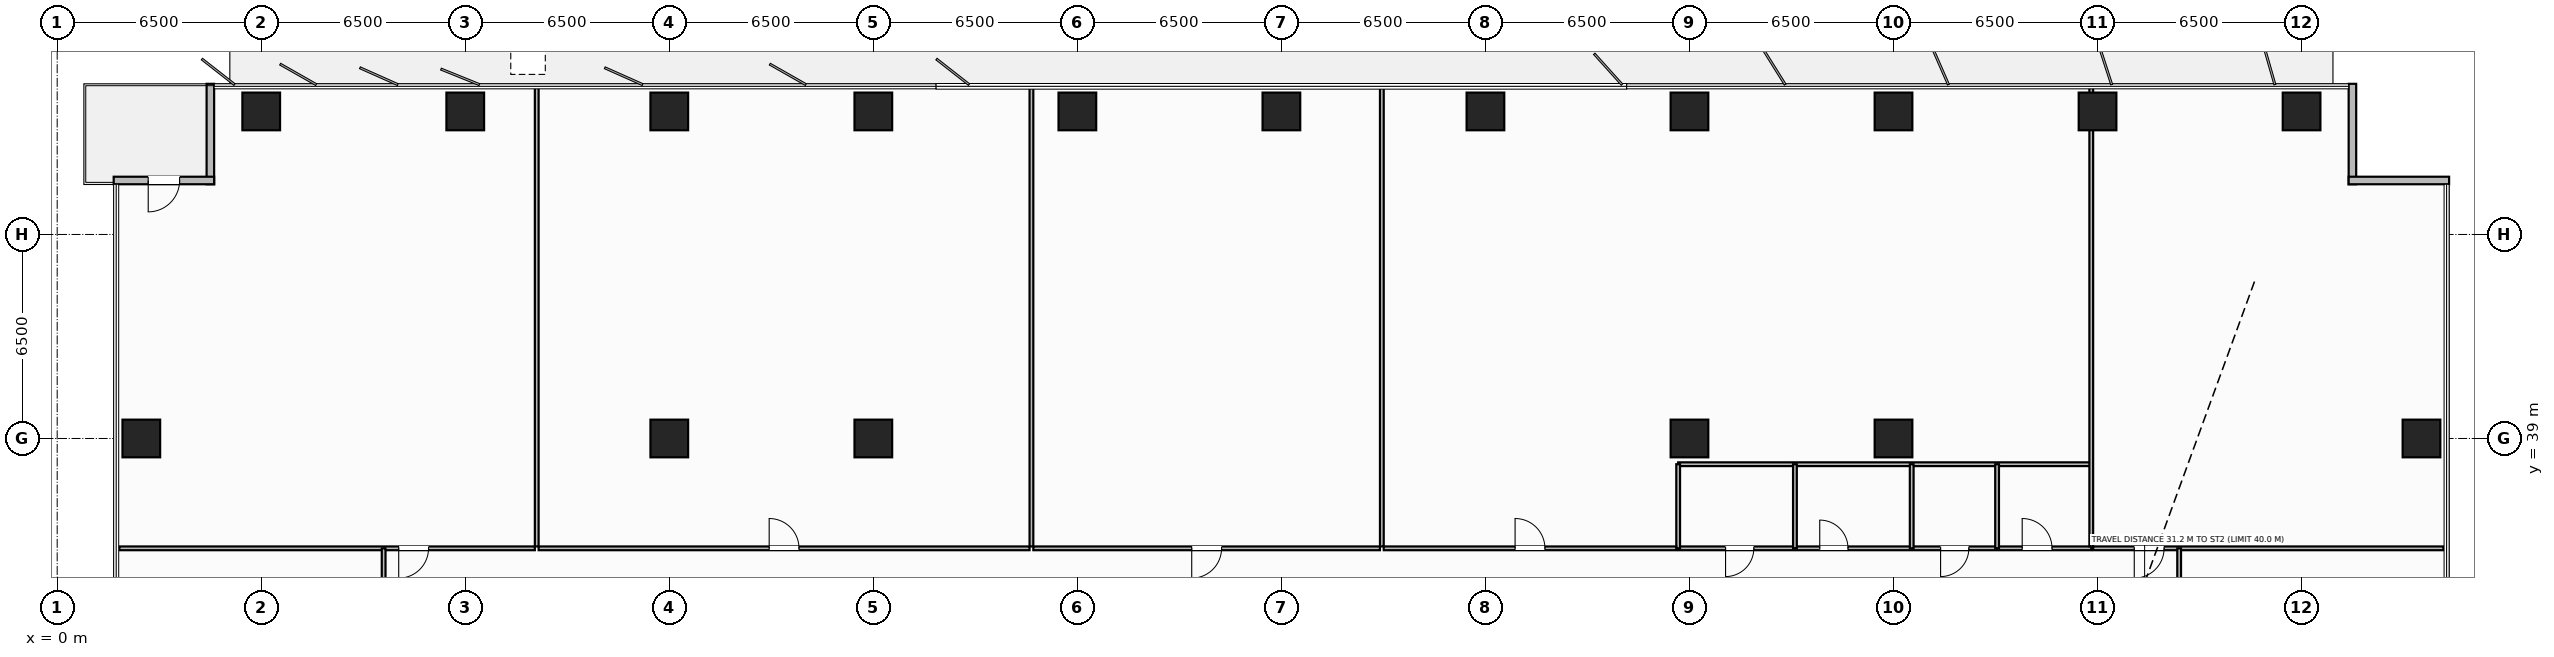
"""IFC4 building model, lengths in metres.
Left out: names, types, materials, properties, quantities, classifications, styles, units other than length and angle.
Written with IfcOpenShell. Run it as: python <this file> out.ifc"""

import sys

from ifc_helpers import new_model, si_unit, direction, frame, frame_2d, origin, origin_2d, place, context, subcontext, project, spatial, rectangle, extrude, element, fill, save


model = new_model("IFC4")
c1 = context("Model", 3, precision=1e-05, world=origin(), true_north=direction((0.0, 1.0)))
c2 = subcontext(c1, "Body", "Model", "MODEL_VIEW")
j1 = project(units=[si_unit("LENGTHUNIT", "METRE"), si_unit("PLANEANGLEUNIT", "RADIAN")], contexts=[c1])
p1 = place(None, origin())
s1 = spatial("IfcSite", under=j1, at=p1, CompositionType="ELEMENT")
p2 = place(p1, origin())
s2 = spatial("IfcBuilding", under=s1, at=p2, CompositionType="ELEMENT")
p3 = place(p2, frame((0.0, 0.0, 86.0)))
s3 = spatial("IfcBuildingStorey", under=s2, at=p3, CompositionType="ELEMENT", Elevation=86.0)
for number, where, z_axis, x_axis in (
    (1, (19.5, 39.0, 0.0), (0.0, 0.0, 1.0), (1.0, 0.0, 0.0)),
    (2, (58.5, 39.0, 0.0), (0.0, 0.0, 1.0), (1.0, 0.0, 0.0)),
    (3, (26.0, 39.0, 0.0), (0.0, 0.0, 1.0), (1.0, 0.0, 0.0)),
    (4, (52.0, 39.0, 0.0), (0.0, 0.0, 1.0), (1.0, 0.0, 0.0)),
    (5, (6.5, 49.42, 0.0), (0.0, 0.0, 1.0), (1.0, 0.0, 0.0)),
    (6, (13.0, 49.42, 0.0), (0.0, 0.0, 1.0), (1.0, 0.0, 0.0)),
    (7, (19.5, 49.42, 0.0), (0.0, 0.0, 1.0), (1.0, 0.0, 0.0)),
    (8, (26.0, 49.42, 0.0), (0.0, 0.0, 1.0), (1.0, 0.0, 0.0)),
    (9, (32.5, 49.42, 0.0), (0.0, 0.0, 1.0), (1.0, 0.0, 0.0)),
    (10, (39.0, 49.42, 0.0), (0.0, 0.0, 1.0), (1.0, 0.0, 0.0)),
    (11, (45.5, 49.42, 0.0), (0.0, 0.0, 1.0), (1.0, 0.0, 0.0)),
    (12, (52.0, 49.42, 0.0), (0.0, 0.0, 1.0), (1.0, 0.0, 0.0)),
    (13, (58.5, 49.42, 0.0), (0.0, 0.0, 1.0), (1.0, 0.0, 0.0)),
    (14, (65.0, 49.42, 0.0), (0.0, 0.0, 1.0), (1.0, 0.0, 0.0)),
    (15, (71.5, 49.42, 0.0), (0.0, 0.0, 1.0), (1.0, 0.0, 0.0)),
    (16, (2.68, 39.0, 0.0), (0.0, 0.0, 1.0), (1.0, 0.0, 0.0)),
    (17, (75.32, 39.0, 0.0), (0.0, 0.0, 1.0), (1.0, 0.0, 0.0)),
):
    element("IfcColumn", number, at=place(p3, frame(where, z_axis=z_axis, x_axis=x_axis)), inside=s3, PredefinedType="COLUMN", context=c2, shape_type="SweptSolid", body=[
        extrude(rectangle(XDim=1.2, YDim=1.2, at=origin_2d()), origin(), (0.0, 0.0, 1.0), 3.8),
    ])
p4 = place(p3, frame((4.88, 47.1, 0.0), z_axis=(0.0, 0.0, 1.0), x_axis=(0.0, 1.0, 0.0)))
e18 = element("IfcWall", 18, at=p4, inside=s3, PredefinedType="STANDARD", context=c2, shape_type="SweptSolid", body=[
    extrude(rectangle(XDim=3.2, YDim=0.24, at=frame_2d((1.6, 0.0))), origin(), (0.0, 0.0, 1.0), 3.565),
])
p5 = place(p3, frame((1.8, 47.22, 0.0), z_axis=(0.0, 0.0, 1.0), x_axis=(1.0, 0.0, 0.0)))
e19 = element("IfcWall", 19, at=p5, inside=s3, PredefinedType="STANDARD", context=c2, shape_type="SweptSolid", body=[
    extrude(rectangle(XDim=3.2, YDim=0.24, at=frame_2d((1.6, 0.0))), origin(), (0.0, 0.0, 1.0), 3.565),
])
p6 = place(p5, frame((1.1, 0.0, 0.0)))
e20 = element("IfcOpeningElement", 20, at=p6, cuts=e19, PredefinedType="OPENING", context=c2, shape_type="SweptSolid", body=[
    extrude(rectangle(XDim=1.0, YDim=2.2, at=frame_2d((0.5, 1.1))), frame((0.0, 0.13, 0.0), z_axis=(0.0, -1.0, 0.0), x_axis=(1.0, 0.0, 0.0)), (0.0, 0.0, 1.0), 0.26),
])
for number, where, z_axis, x_axis in (
    (21, (73.12, 50.3, 0.0), (0.0, 0.0, 1.0), (0.0, -1.0, 0.0)),
    (22, (73.0, 47.22, 0.0), (0.0, 0.0, 1.0), (1.0, 0.0, 0.0)),
):
    element("IfcWall", number, at=place(p3, frame(where, z_axis=z_axis, x_axis=x_axis)), inside=s3, PredefinedType="STANDARD", context=c2, shape_type="SweptSolid", body=[
        extrude(rectangle(XDim=3.2, YDim=0.24, at=frame_2d((1.6, 0.0))), origin(), (0.0, 0.0, 1.0), 3.565),
    ])
p7 = place(p3, frame((51.64, 35.5, 0.0), z_axis=(0.0, 0.0, 1.0), x_axis=(1.0, 0.0, 0.0)))
e23 = element("IfcWall", 23, at=p7, inside=s3, PredefinedType="PARTITIONING", context=c2, shape_type="SweptSolid", body=[
    extrude(rectangle(XDim=13.16, YDim=0.12, at=frame_2d((6.58, 0.0))), origin(), (0.0, 0.0, 1.0), 3.565),
])
p8 = place(p7, frame((1.51, 0.0, 0.0)))
e24 = element("IfcOpeningElement", 24, at=p8, cuts=e23, PredefinedType="OPENING", context=c2, shape_type="SweptSolid", body=[
    extrude(rectangle(XDim=0.9, YDim=2.15, at=frame_2d((0.45, 1.075))), frame((0.0, 0.07, 0.0), z_axis=(0.0, -1.0, 0.0), x_axis=(1.0, 0.0, 0.0)), (0.0, 0.0, 1.0), 0.14),
])
p9 = place(p7, frame((4.51, 0.0, 0.0)))
e25 = element("IfcOpeningElement", 25, at=p9, cuts=e23, PredefinedType="OPENING", context=c2, shape_type="SweptSolid", body=[
    extrude(rectangle(XDim=0.9, YDim=2.15, at=frame_2d((0.45, 1.075))), frame((0.0, 0.07, 0.0), z_axis=(0.0, -1.0, 0.0), x_axis=(1.0, 0.0, 0.0)), (0.0, 0.0, 1.0), 0.14),
])
p10 = place(p7, frame((8.36, 0.0, 0.0)))
e26 = element("IfcOpeningElement", 26, at=p10, cuts=e23, PredefinedType="OPENING", context=c2, shape_type="SweptSolid", body=[
    extrude(rectangle(XDim=0.9, YDim=2.15, at=frame_2d((0.45, 1.075))), frame((0.0, 0.07, 0.0), z_axis=(0.0, -1.0, 0.0), x_axis=(1.0, 0.0, 0.0)), (0.0, 0.0, 1.0), 0.14),
])
p11 = place(p7, frame((10.96, 0.0, 0.0)))
e27 = element("IfcOpeningElement", 27, at=p11, cuts=e23, PredefinedType="OPENING", context=c2, shape_type="SweptSolid", body=[
    extrude(rectangle(XDim=0.95, YDim=2.15, at=frame_2d((0.475, 1.075))), frame((0.0, 0.07, 0.0), z_axis=(0.0, -1.0, 0.0), x_axis=(1.0, 0.0, 0.0)), (0.0, 0.0, 1.0), 0.14),
])
p12 = place(p3, frame((51.64, 38.18, 0.0), z_axis=(0.0, 0.0, 1.0), x_axis=(1.0, 0.0, 0.0)))
e28 = element("IfcWall", 28, at=p12, inside=s3, PredefinedType="PARTITIONING", context=c2, shape_type="SweptSolid", body=[
    extrude(rectangle(XDim=13.16, YDim=0.12, at=frame_2d((6.58, 0.0))), origin(), (0.0, 0.0, 1.0), 3.565),
])
for number, where, z_axis, x_axis in (
    (29, (51.64, 35.5, 0.0), (0.0, 0.0, 1.0), (0.0, 1.0, 0.0)),
    (30, (55.36, 35.5, 0.0), (0.0, 0.0, 1.0), (0.0, 1.0, 0.0)),
    (31, (59.08, 35.5, 0.0), (0.0, 0.0, 1.0), (0.0, 1.0, 0.0)),
    (32, (61.8, 35.5, 0.0), (0.0, 0.0, 1.0), (0.0, 1.0, 0.0)),
):
    element("IfcWall", number, at=place(p3, frame(where, z_axis=z_axis, x_axis=x_axis)), inside=s3, PredefinedType="PARTITIONING", context=c2, shape_type="SweptSolid", body=[
        extrude(rectangle(XDim=2.68, YDim=0.12, at=frame_2d((1.34, 0.0))), origin(), (0.0, 0.0, 1.0), 3.565),
    ])
p13 = place(p3, frame((15.277, 35.56, 0.0), z_axis=(0.0, 0.0, 1.0), x_axis=(0.0, 1.0, 0.0)))
e33 = element("IfcWall", 33, at=p13, inside=s3, PredefinedType="PARTITIONING", context=c2, shape_type="SweptSolid", body=[
    extrude(rectangle(XDim=14.72, YDim=0.12, at=frame_2d((7.36, 0.0))), origin(), (0.0, 0.0, 1.0), 3.565),
])
p14 = place(p3, frame((1.98, 35.5, 0.0), z_axis=(0.0, 0.0, 1.0), x_axis=(1.0, 0.0, 0.0)))
e34 = element("IfcWall", 34, at=p14, inside=s3, PredefinedType="PARTITIONING", context=c2, shape_type="SweptSolid", body=[
    extrude(rectangle(XDim=13.237, YDim=0.12, at=frame_2d((6.619, 0.0))), origin(), (0.0, 0.0, 1.0), 3.565),
])
p15 = place(p14, frame((8.9, 0.0, 0.0)))
e35 = element("IfcOpeningElement", 35, at=p15, cuts=e34, PredefinedType="OPENING", context=c2, shape_type="SweptSolid", body=[
    extrude(rectangle(XDim=0.95, YDim=2.15, at=frame_2d((0.475, 1.075))), frame((0.0, 0.07, 0.0), z_axis=(0.0, -1.0, 0.0), x_axis=(1.0, 0.0, 0.0)), (0.0, 0.0, 1.0), 0.14),
])
p16 = place(p3, frame((31.037, 35.56, 0.0), z_axis=(0.0, 0.0, 1.0), x_axis=(0.0, 1.0, 0.0)))
e36 = element("IfcWall", 36, at=p16, inside=s3, PredefinedType="PARTITIONING", context=c2, shape_type="SweptSolid", body=[
    extrude(rectangle(XDim=14.72, YDim=0.12, at=frame_2d((7.36, 0.0))), origin(), (0.0, 0.0, 1.0), 3.565),
])
p17 = place(p3, frame((15.337, 35.5, 0.0), z_axis=(0.0, 0.0, 1.0), x_axis=(1.0, 0.0, 0.0)))
e37 = element("IfcWall", 37, at=p17, inside=s3, PredefinedType="PARTITIONING", context=c2, shape_type="SweptSolid", body=[
    extrude(rectangle(XDim=15.64, YDim=0.12, at=frame_2d((7.82, 0.0))), origin(), (0.0, 0.0, 1.0), 3.565),
])
p18 = place(p17, frame((7.345, 0.0, 0.0)))
e38 = element("IfcOpeningElement", 38, at=p18, cuts=e37, PredefinedType="OPENING", context=c2, shape_type="SweptSolid", body=[
    extrude(rectangle(XDim=0.95, YDim=2.15, at=frame_2d((0.475, 1.075))), frame((0.0, 0.07, 0.0), z_axis=(0.0, -1.0, 0.0), x_axis=(1.0, 0.0, 0.0)), (0.0, 0.0, 1.0), 0.14),
])
p19 = place(p3, frame((42.2, 35.56, 0.0), z_axis=(0.0, 0.0, 1.0), x_axis=(0.0, 1.0, 0.0)))
e39 = element("IfcWall", 39, at=p19, inside=s3, PredefinedType="PARTITIONING", context=c2, shape_type="SweptSolid", body=[
    extrude(rectangle(XDim=14.72, YDim=0.12, at=frame_2d((7.36, 0.0))), origin(), (0.0, 0.0, 1.0), 3.565),
])
p20 = place(p3, frame((31.097, 35.5, 0.0), z_axis=(0.0, 0.0, 1.0), x_axis=(1.0, 0.0, 0.0)))
e40 = element("IfcWall", 40, at=p20, inside=s3, PredefinedType="PARTITIONING", context=c2, shape_type="SweptSolid", body=[
    extrude(rectangle(XDim=11.043, YDim=0.12, at=frame_2d((5.521, 0.0))), origin(), (0.0, 0.0, 1.0), 3.565),
])
p21 = place(p20, frame((5.046, 0.0, 0.0)))
e41 = element("IfcOpeningElement", 41, at=p21, cuts=e40, PredefinedType="OPENING", context=c2, shape_type="SweptSolid", body=[
    extrude(rectangle(XDim=0.95, YDim=2.15, at=frame_2d((0.475, 1.075))), frame((0.0, 0.07, 0.0), z_axis=(0.0, -1.0, 0.0), x_axis=(1.0, 0.0, 0.0)), (0.0, 0.0, 1.0), 0.14),
])
p22 = place(p3, frame((64.8, 35.56, 0.0), z_axis=(0.0, 0.0, 1.0), x_axis=(0.0, 1.0, 0.0)))
e42 = element("IfcWall", 42, at=p22, inside=s3, PredefinedType="PARTITIONING", context=c2, shape_type="SweptSolid", body=[
    extrude(rectangle(XDim=14.72, YDim=0.12, at=frame_2d((7.36, 0.0))), origin(), (0.0, 0.0, 1.0), 2.965),
])
p23 = place(p3, frame((42.26, 35.5, 0.0), z_axis=(0.0, 0.0, 1.0), x_axis=(1.0, 0.0, 0.0)))
e43 = element("IfcWall", 43, at=p23, inside=s3, PredefinedType="PARTITIONING", context=c2, shape_type="SweptSolid", body=[
    extrude(rectangle(XDim=9.32, YDim=0.12, at=frame_2d((4.66, 0.0))), origin(), (0.0, 0.0, 1.0), 3.565),
])
p24 = place(p23, frame((4.185, 0.0, 0.0)))
e44 = element("IfcOpeningElement", 44, at=p24, cuts=e43, PredefinedType="OPENING", context=c2, shape_type="SweptSolid", body=[
    extrude(rectangle(XDim=0.95, YDim=2.15, at=frame_2d((0.475, 1.075))), frame((0.0, 0.07, 0.0), z_axis=(0.0, -1.0, 0.0), x_axis=(1.0, 0.0, 0.0)), (0.0, 0.0, 1.0), 0.14),
])
p25 = place(p3, frame((64.86, 35.5, 0.0), z_axis=(0.0, 0.0, 1.0), x_axis=(1.0, 0.0, 0.0)))
e45 = element("IfcWall", 45, at=p25, inside=s3, PredefinedType="PARTITIONING", context=c2, shape_type="SweptSolid", body=[
    extrude(rectangle(XDim=11.16, YDim=0.12, at=frame_2d((5.58, 0.0))), origin(), (0.0, 0.0, 1.0), 3.565),
])
p26 = place(p25, frame((1.31, 0.0, 0.0)))
e46 = element("IfcOpeningElement", 46, at=p26, cuts=e45, PredefinedType="OPENING", context=c2, shape_type="SweptSolid", body=[
    extrude(rectangle(XDim=0.95, YDim=2.15, at=frame_2d((0.475, 1.075))), frame((0.0, 0.07, 0.0), z_axis=(0.0, -1.0, 0.0), x_axis=(1.0, 0.0, 0.0)), (0.0, 0.0, 1.0), 0.14),
])
p27 = place(p3, frame((10.4, 29.167, 0.0), z_axis=(0.0, 0.0, 1.0), x_axis=(0.0, 1.0, 0.0)))
e47 = element("IfcWall", 47, at=p27, inside=s3, PredefinedType="PARTITIONING", context=c2, shape_type="SweptSolid", body=[
    extrude(rectangle(XDim=6.333, YDim=0.12, at=frame_2d((3.167, 0.0))), origin(), (0.0, 0.0, 1.0), 3.565),
])
p28 = place(p27, frame((1.642, 0.0, 0.0)))
e48 = element("IfcOpeningElement", 48, at=p28, cuts=e47, PredefinedType="OPENING", context=c2, shape_type="SweptSolid", body=[
    extrude(rectangle(XDim=0.95, YDim=2.15, at=frame_2d((0.475, 1.075))), frame((0.0, 0.07, 0.0), z_axis=(0.0, -1.0, 0.0), x_axis=(1.0, 0.0, 0.0)), (0.0, 0.0, 1.0), 0.14),
])
p29 = place(p3, frame((67.6, 16.5, 0.0), z_axis=(0.0, 0.0, 1.0), x_axis=(0.0, 1.0, 0.0)))
e49 = element("IfcWall", 49, at=p29, inside=s3, PredefinedType="PARTITIONING", context=c2, shape_type="SweptSolid", body=[
    extrude(rectangle(XDim=19.0, YDim=0.12, at=frame_2d((9.5, 0.0))), origin(), (0.0, 0.0, 1.0), 3.565),
])
p30 = place(p29, frame((9.025, 0.0, 0.0)))
e50 = element("IfcOpeningElement", 50, at=p30, cuts=e49, PredefinedType="OPENING", context=c2, shape_type="SweptSolid", body=[
    extrude(rectangle(XDim=0.95, YDim=2.15, at=frame_2d((0.475, 1.075))), frame((0.0, 0.07, 0.0), z_axis=(0.0, -1.0, 0.0), x_axis=(1.0, 0.0, 0.0)), (0.0, 0.0, 1.0), 0.14),
])
p31 = place(p6, origin())
e51 = element("IfcDoor", 51, at=p31, inside=s3, OperationType="SINGLE_SWING_RIGHT", PredefinedType="DOOR", context=c2, shape_type="SweptSolid", body=[
    extrude(rectangle(XDim=1.0, YDim=2.2, at=frame_2d((0.5, 1.1))), frame((0.0, 0.025, 0.0), z_axis=(0.0, -1.0, 0.0), x_axis=(1.0, 0.0, 0.0)), (0.0, 0.0, 1.0), 0.05),
])
fill(e20, e51)
p32 = place(p3, frame((0.0, 0.0, -0.21)))
p33 = place(p32, frame((15.0, 51.15, 0.0)))
p34 = place(p33, frame((0.0, 0.0, 0.21)))
e52 = element("IfcDoor", 52, at=p34, inside=s3, OperationType="SINGLE_SWING_LEFT", PredefinedType="TRAPDOOR", context=c2, shape_type="SweptSolid", body=[
    extrude(rectangle(XDim=1.1, YDim=1.1, at=origin_2d()), origin(), (0.0, 0.0, 1.0), 0.05),
])
p35 = place(p8, origin())
e53 = element("IfcDoor", 53, at=p35, inside=s3, OperationType="SINGLE_SWING_RIGHT", PredefinedType="DOOR", context=c2, shape_type="SweptSolid", body=[
    extrude(rectangle(XDim=0.9, YDim=2.15, at=frame_2d((0.45, 1.075))), frame((0.0, 0.025, 0.0), z_axis=(0.0, -1.0, 0.0), x_axis=(1.0, 0.0, 0.0)), (0.0, 0.0, 1.0), 0.05),
])
fill(e24, e53)
p36 = place(p9, origin())
e54 = element("IfcDoor", 54, at=p36, inside=s3, OperationType="SINGLE_SWING_LEFT", PredefinedType="DOOR", context=c2, shape_type="SweptSolid", body=[
    extrude(rectangle(XDim=0.9, YDim=2.15, at=frame_2d((0.45, 1.075))), frame((0.0, 0.025, 0.0), z_axis=(0.0, -1.0, 0.0), x_axis=(1.0, 0.0, 0.0)), (0.0, 0.0, 1.0), 0.05),
])
fill(e25, e54)
p37 = place(p10, origin())
e55 = element("IfcDoor", 55, at=p37, inside=s3, OperationType="SINGLE_SWING_RIGHT", PredefinedType="DOOR", context=c2, shape_type="SweptSolid", body=[
    extrude(rectangle(XDim=0.9, YDim=2.15, at=frame_2d((0.45, 1.075))), frame((0.0, 0.025, 0.0), z_axis=(0.0, -1.0, 0.0), x_axis=(1.0, 0.0, 0.0)), (0.0, 0.0, 1.0), 0.05),
])
fill(e26, e55)
p38 = place(p11, origin())
e56 = element("IfcDoor", 56, at=p38, inside=s3, OperationType="SINGLE_SWING_LEFT", PredefinedType="DOOR", context=c2, shape_type="SweptSolid", body=[
    extrude(rectangle(XDim=0.95, YDim=2.15, at=frame_2d((0.475, 1.075))), frame((0.0, 0.025, 0.0), z_axis=(0.0, -1.0, 0.0), x_axis=(1.0, 0.0, 0.0)), (0.0, 0.0, 1.0), 0.05),
])
fill(e27, e56)
p39 = place(p15, origin())
e57 = element("IfcDoor", 57, at=p39, inside=s3, OperationType="SINGLE_SWING_RIGHT", PredefinedType="DOOR", context=c2, shape_type="SweptSolid", body=[
    extrude(rectangle(XDim=0.95, YDim=2.15, at=frame_2d((0.475, 1.075))), frame((0.0, 0.025, 0.0), z_axis=(0.0, -1.0, 0.0), x_axis=(1.0, 0.0, 0.0)), (0.0, 0.0, 1.0), 0.05),
])
fill(e35, e57)
p40 = place(p18, origin())
e58 = element("IfcDoor", 58, at=p40, inside=s3, OperationType="SINGLE_SWING_LEFT", PredefinedType="DOOR", context=c2, shape_type="SweptSolid", body=[
    extrude(rectangle(XDim=0.95, YDim=2.15, at=frame_2d((0.475, 1.075))), frame((0.0, 0.025, 0.0), z_axis=(0.0, -1.0, 0.0), x_axis=(1.0, 0.0, 0.0)), (0.0, 0.0, 1.0), 0.05),
])
fill(e38, e58)
p41 = place(p21, origin())
e59 = element("IfcDoor", 59, at=p41, inside=s3, OperationType="SINGLE_SWING_RIGHT", PredefinedType="DOOR", context=c2, shape_type="SweptSolid", body=[
    extrude(rectangle(XDim=0.95, YDim=2.15, at=frame_2d((0.475, 1.075))), frame((0.0, 0.025, 0.0), z_axis=(0.0, -1.0, 0.0), x_axis=(1.0, 0.0, 0.0)), (0.0, 0.0, 1.0), 0.05),
])
fill(e41, e59)
p42 = place(p24, origin())
e60 = element("IfcDoor", 60, at=p42, inside=s3, OperationType="SINGLE_SWING_LEFT", PredefinedType="DOOR", context=c2, shape_type="SweptSolid", body=[
    extrude(rectangle(XDim=0.95, YDim=2.15, at=frame_2d((0.475, 1.075))), frame((0.0, 0.025, 0.0), z_axis=(0.0, -1.0, 0.0), x_axis=(1.0, 0.0, 0.0)), (0.0, 0.0, 1.0), 0.05),
])
fill(e44, e60)
p43 = place(p26, origin())
e61 = element("IfcDoor", 61, at=p43, inside=s3, OperationType="SINGLE_SWING_RIGHT", PredefinedType="DOOR", context=c2, shape_type="SweptSolid", body=[
    extrude(rectangle(XDim=0.95, YDim=2.15, at=frame_2d((0.475, 1.075))), frame((0.0, 0.025, 0.0), z_axis=(0.0, -1.0, 0.0), x_axis=(1.0, 0.0, 0.0)), (0.0, 0.0, 1.0), 0.05),
])
fill(e46, e61)
save(model, sys.argv[1])
